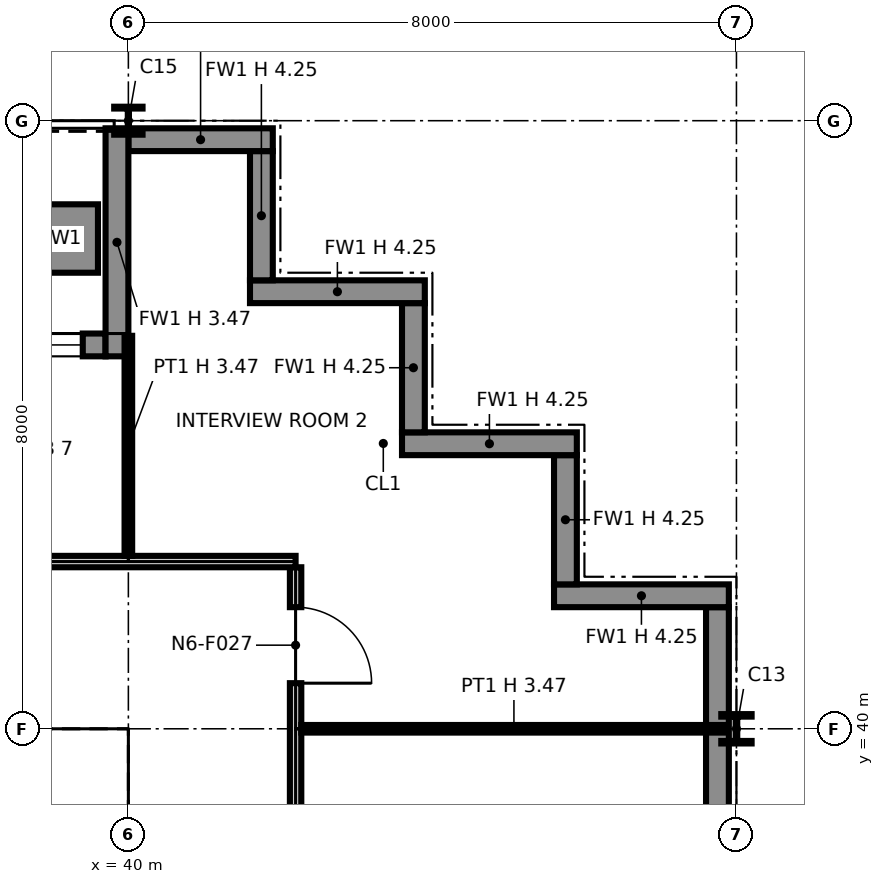
"""IFC4 building model, lengths in metres.
Left out: names, types, materials, properties, quantities, classifications, styles, units other than length and angle.
Written with IfcOpenShell. Run it as: python <this file> out.ifc"""

import sys

from ifc_helpers import new_model, si_unit, direction, frame, frame_2d, origin, origin_2d, place, context, subcontext, project, spatial, polyline, rectangle, i_section, outline, extrude, element, fill, save


model = new_model("IFC4")
c1 = context("Model", 3, precision=1e-05, world=origin(), true_north=direction((0.0, 1.0)))
c2 = subcontext(c1, "Body", "Model", "MODEL_VIEW")
j1 = project(units=[si_unit("LENGTHUNIT", "METRE"), si_unit("PLANEANGLEUNIT", "RADIAN")], contexts=[c1])
p1 = place(None, origin())
s1 = spatial("IfcSite", under=j1, at=p1, CompositionType="ELEMENT")
p2 = place(p1, origin())
s2 = spatial("IfcBuilding", under=s1, at=p2, CompositionType="ELEMENT")
p3 = place(p2, frame((0.0, 0.0, 100.8)))
s3 = spatial("IfcBuildingStorey", under=s2, at=p3, CompositionType="ELEMENT", Elevation=100.8)
p4 = place(p3, frame((40.0, 40.0, 0.0), z_axis=(0.0, 0.0, 1.0), x_axis=(1.0, 0.0, 0.0)))
e1 = element("IfcColumn", 1, at=p4, inside=s3, PredefinedType="COLUMN", context=c2, shape_type="SweptSolid", body=[
    extrude(i_section(OverallWidth=0.257, OverallDepth=0.363, WebThickness=0.013, FlangeThickness=0.022, at=origin_2d()), origin(), (0.0, 0.0, 1.0), 4.25),
])
p5 = place(p3, frame((40.0, 48.0, 0.0), z_axis=(0.0, 0.0, 1.0), x_axis=(1.0, 0.0, 0.0)))
e2 = element("IfcColumn", 2, at=p5, inside=s3, PredefinedType="COLUMN", context=c2, shape_type="SweptSolid", body=[
    extrude(i_section(OverallWidth=0.373, OverallDepth=0.368, WebThickness=0.015, FlangeThickness=0.024, at=origin_2d()), origin(), (0.0, 0.0, 1.0), 4.25),
])
p6 = place(p3, frame((48.0, 40.0, 0.0), z_axis=(0.0, 0.0, 1.0), x_axis=(1.0, 0.0, 0.0)))
e3 = element("IfcColumn", 3, at=p6, inside=s3, PredefinedType="COLUMN", context=c2, shape_type="SweptSolid", body=[
    extrude(i_section(OverallWidth=0.399, OverallDepth=0.386, WebThickness=0.021, FlangeThickness=0.033, at=origin_2d()), origin(), (0.0, 0.0, 1.0), 4.25),
])
p7 = place(p3, frame((47.75, 32.0, 0.0), z_axis=(0.0, 0.0, 1.0), x_axis=(0.0, 1.0, 0.0)))
e4 = element("IfcWall", 4, at=p7, inside=s3, PredefinedType="SOLIDWALL", context=c2, shape_type="SweptSolid", body=[
    extrude(rectangle(XDim=9.6, YDim=0.3, at=frame_2d((4.8, 0.0))), origin(), (0.0, 0.0, 1.0), 4.25),
])
p8 = place(p3, frame((47.9, 41.75, 0.0), z_axis=(0.0, 0.0, 1.0), x_axis=(-1.0, 0.0, 0.0)))
e5 = element("IfcWall", 5, at=p8, inside=s3, PredefinedType="SOLIDWALL", context=c2, shape_type="SweptSolid", body=[
    extrude(rectangle(XDim=2.3, YDim=0.3, at=frame_2d((1.15, 0.0))), origin(), (0.0, 0.0, 1.0), 4.25),
])
p9 = place(p3, frame((45.75, 41.9, 0.0), z_axis=(0.0, 0.0, 1.0), x_axis=(0.0, 1.0, 0.0)))
e6 = element("IfcWall", 6, at=p9, inside=s3, PredefinedType="SOLIDWALL", context=c2, shape_type="SweptSolid", body=[
    extrude(rectangle(XDim=1.7, YDim=0.3, at=frame_2d((0.85, 0.0))), origin(), (0.0, 0.0, 1.0), 4.25),
])
p10 = place(p3, frame((45.9, 43.75, 0.0), z_axis=(0.0, 0.0, 1.0), x_axis=(-1.0, 0.0, 0.0)))
e7 = element("IfcWall", 7, at=p10, inside=s3, PredefinedType="SOLIDWALL", context=c2, shape_type="SweptSolid", body=[
    extrude(rectangle(XDim=2.3, YDim=0.3, at=frame_2d((1.15, 0.0))), origin(), (0.0, 0.0, 1.0), 4.25),
])
p11 = place(p3, frame((43.75, 43.9, 0.0), z_axis=(0.0, 0.0, 1.0), x_axis=(0.0, 1.0, 0.0)))
e8 = element("IfcWall", 8, at=p11, inside=s3, PredefinedType="SOLIDWALL", context=c2, shape_type="SweptSolid", body=[
    extrude(rectangle(XDim=1.7, YDim=0.3, at=frame_2d((0.85, 0.0))), origin(), (0.0, 0.0, 1.0), 4.25),
])
p12 = place(p3, frame((43.9, 45.75, 0.0), z_axis=(0.0, 0.0, 1.0), x_axis=(-1.0, 0.0, 0.0)))
e9 = element("IfcWall", 9, at=p12, inside=s3, PredefinedType="SOLIDWALL", context=c2, shape_type="SweptSolid", body=[
    extrude(rectangle(XDim=2.3, YDim=0.3, at=frame_2d((1.15, 0.0))), origin(), (0.0, 0.0, 1.0), 4.25),
])
p13 = place(p3, frame((41.75, 45.9, 0.0), z_axis=(0.0, 0.0, 1.0), x_axis=(0.0, 1.0, 0.0)))
e10 = element("IfcWall", 10, at=p13, inside=s3, PredefinedType="SOLIDWALL", context=c2, shape_type="SweptSolid", body=[
    extrude(rectangle(XDim=1.7, YDim=0.3, at=frame_2d((0.85, 0.0))), origin(), (0.0, 0.0, 1.0), 4.25),
])
p14 = place(p3, frame((41.9, 47.75, 0.0), z_axis=(0.0, 0.0, 1.0), x_axis=(-1.0, 0.0, 0.0)))
e11 = element("IfcWall", 11, at=p14, inside=s3, PredefinedType="SOLIDWALL", context=c2, shape_type="SweptSolid", body=[
    extrude(rectangle(XDim=1.9, YDim=0.3, at=frame_2d((0.95, 0.0))), origin(), (0.0, 0.0, 1.0), 4.25),
])
p15 = place(p3, frame((39.7, 45.05, 0.0), z_axis=(0.0, 0.0, 1.0), x_axis=(-1.0, 0.0, 0.0)))
e12 = element("IfcWall", 12, at=p15, inside=s3, PredefinedType="SOLIDWALL", context=c2, shape_type="SweptSolid", body=[
    extrude(rectangle(XDim=7.4, YDim=0.3, at=frame_2d((3.7, 0.0))), origin(), (0.0, 0.0, 1.0), 4.25),
])
p16 = place(p15, frame((0.3, 0.0, 0.9)))
e13 = element("IfcOpeningElement", 13, at=p16, cuts=e12, PredefinedType="OPENING", context=c2, shape_type="SweptSolid", body=[
    extrude(rectangle(XDim=2.8, YDim=2.2, at=frame_2d((1.4, 1.1))), frame((0.0, 0.16, 0.0), z_axis=(0.0, -1.0, 0.0), x_axis=(1.0, 0.0, 0.0)), (0.0, 0.0, 1.0), 0.32),
])
p17 = place(p15, frame((4.7, 0.0, 0.0)))
e14 = element("IfcOpeningElement", 14, at=p17, cuts=e12, PredefinedType="OPENING", context=c2, shape_type="SweptSolid", body=[
    extrude(rectangle(XDim=2.0, YDim=2.4, at=frame_2d((1.0, 1.2))), frame((0.0, 0.16, 0.0), z_axis=(0.0, -1.0, 0.0), x_axis=(1.0, 0.0, 0.0)), (0.0, 0.0, 1.0), 0.32),
])
p18 = place(p3, frame((39.85, 47.9, 0.0), z_axis=(0.0, 0.0, 1.0), x_axis=(0.0, -1.0, 0.0)))
e15 = element("IfcWall", 15, at=p18, inside=s3, PredefinedType="SOLIDWALL", context=c2, shape_type="SweptSolid", body=[
    extrude(rectangle(XDim=3.0, YDim=0.3, at=frame_2d((1.5, 0.0))), origin(), (0.0, 0.0, 1.0), 3.469),
])
p19 = place(p3, frame((39.6, 46.45, 0.0), z_axis=(0.0, 0.0, 1.0), x_axis=(-1.0, 0.0, 0.0)))
e16 = element("IfcWall", 16, at=p19, inside=s3, PredefinedType="SOLIDWALL", context=c2, shape_type="SweptSolid", body=[
    extrude(rectangle(XDim=3.2, YDim=0.9, at=frame_2d((1.6, 0.0))), origin(), (0.0, 0.0, 1.0), 0.6),
])
p20 = place(p3, frame((24.65, 39.25, 0.0), z_axis=(0.0, 0.0, 1.0), x_axis=(1.0, 0.0, 0.0)))
e17 = element("IfcWall", 17, at=p20, inside=s3, PredefinedType="PARTITIONING", context=c2, shape_type="SweptSolid", body=[
    extrude(outline(polyline([(0.0, 0.0), (14.7, 0.0), (14.7, 4.25), (7.469, 4.25), (7.469, 3.632), (7.231, 3.632), (7.23, 4.25), (0.0, 4.25), (0.0, 0.0)])), frame((0.0, 0.1, 0.0), z_axis=(0.0, -1.0, 0.0), x_axis=(1.0, 0.0, 0.0)), (0.0, 0.0, 1.0), 0.2),
])
p21 = place(p3, frame((39.25, 32.85, 0.0), z_axis=(0.0, 0.0, 1.0), x_axis=(0.0, 1.0, 0.0)))
e18 = element("IfcWall", 18, at=p21, inside=s3, PredefinedType="PARTITIONING", context=c2, shape_type="SweptSolid", body=[
    extrude(rectangle(XDim=6.3, YDim=0.2, at=frame_2d((3.15, 0.0))), origin(), (0.0, 0.0, 1.0), 4.25),
])
p22 = place(p3, frame((42.2, 16.0, 0.0), z_axis=(0.0, 0.0, 1.0), x_axis=(0.0, 1.0, 0.0)))
e19 = element("IfcWall", 19, at=p22, inside=s3, PredefinedType="PARTITIONING", context=c2, shape_type="SweptSolid", body=[
    extrude(outline(polyline([(0.0, 0.0), (26.125, 0.0), (26.125, 4.25), (24.3, 4.25), (24.298, 3.47), (23.702, 3.47), (23.7, 4.25), (20.3, 4.25), (20.298, 3.47), (19.702, 3.47), (19.7, 4.25), (16.3, 4.25), (16.298, 3.47), (15.702, 3.47), (15.7, 4.25), (12.3, 4.25), (12.298, 3.47), (11.702, 3.47), (11.7, 4.25), (8.3, 4.25), (8.298, 3.47), (7.702, 3.47), (7.7, 4.25), (4.3, 4.25), (4.298, 3.47), (3.702, 3.47), (3.7, 4.25), (0.0, 4.25), (0.0, 0.0)])), frame((0.0, 0.075, 0.0), z_axis=(0.0, -1.0, 0.0), x_axis=(1.0, 0.0, 0.0)), (0.0, 0.0, 1.0), 0.15),
])
p23 = place(p22, frame((2.5, 0.0, 0.0), z_axis=(0.0, 0.0, 1.0), x_axis=(-1.0, 0.0, 0.0)))
e20 = element("IfcOpeningElement", 20, at=p23, cuts=e19, PredefinedType="OPENING", context=c2, shape_type="SweptSolid", body=[
    extrude(rectangle(XDim=1.0, YDim=2.1, at=frame_2d((0.5, 1.05))), frame((0.0, 0.085, 0.0), z_axis=(0.0, -1.0, 0.0), x_axis=(1.0, 0.0, 0.0)), (0.0, 0.0, 1.0), 0.17),
])
p24 = place(p22, frame((6.5, 0.0, 0.0), z_axis=(0.0, 0.0, 1.0), x_axis=(-1.0, 0.0, 0.0)))
e21 = element("IfcOpeningElement", 21, at=p24, cuts=e19, PredefinedType="OPENING", context=c2, shape_type="SweptSolid", body=[
    extrude(rectangle(XDim=1.0, YDim=2.1, at=frame_2d((0.5, 1.05))), frame((0.0, 0.085, 0.0), z_axis=(0.0, -1.0, 0.0), x_axis=(1.0, 0.0, 0.0)), (0.0, 0.0, 1.0), 0.17),
])
p25 = place(p22, frame((12.5, 0.0, 0.0), z_axis=(0.0, 0.0, 1.0), x_axis=(-1.0, 0.0, 0.0)))
e22 = element("IfcOpeningElement", 22, at=p25, cuts=e19, PredefinedType="OPENING", context=c2, shape_type="SweptSolid", body=[
    extrude(rectangle(XDim=1.0, YDim=2.1, at=frame_2d((0.5, 1.05))), frame((0.0, 0.085, 0.0), z_axis=(0.0, -1.0, 0.0), x_axis=(1.0, 0.0, 0.0)), (0.0, 0.0, 1.0), 0.17),
])
p26 = place(p22, frame((18.5, 0.0, 0.0), z_axis=(0.0, 0.0, 1.0), x_axis=(-1.0, 0.0, 0.0)))
e23 = element("IfcOpeningElement", 23, at=p26, cuts=e19, PredefinedType="OPENING", context=c2, shape_type="SweptSolid", body=[
    extrude(rectangle(XDim=1.0, YDim=2.1, at=frame_2d((0.5, 1.05))), frame((0.0, 0.085, 0.0), z_axis=(0.0, -1.0, 0.0), x_axis=(1.0, 0.0, 0.0)), (0.0, 0.0, 1.0), 0.17),
])
p27 = place(p22, frame((22.5, 0.0, 0.0), z_axis=(0.0, 0.0, 1.0), x_axis=(-1.0, 0.0, 0.0)))
e24 = element("IfcOpeningElement", 24, at=p27, cuts=e19, PredefinedType="OPENING", context=c2, shape_type="SweptSolid", body=[
    extrude(rectangle(XDim=1.0, YDim=2.1, at=frame_2d((0.5, 1.05))), frame((0.0, 0.085, 0.0), z_axis=(0.0, -1.0, 0.0), x_axis=(1.0, 0.0, 0.0)), (0.0, 0.0, 1.0), 0.17),
])
p28 = place(p22, frame((25.6, 0.0, 0.0), z_axis=(0.0, 0.0, 1.0), x_axis=(-1.0, 0.0, 0.0)))
e25 = element("IfcOpeningElement", 25, at=p28, cuts=e19, PredefinedType="OPENING", context=c2, shape_type="SweptSolid", body=[
    extrude(rectangle(XDim=1.0, YDim=2.1, at=frame_2d((0.5, 1.05))), frame((0.0, 0.085, 0.0), z_axis=(0.0, -1.0, 0.0), x_axis=(1.0, 0.0, 0.0)), (0.0, 0.0, 1.0), 0.17),
])
p29 = place(p3, frame((42.275, 40.0, 0.0), z_axis=(0.0, 0.0, 1.0), x_axis=(1.0, 0.0, 0.0)))
e26 = element("IfcWall", 26, at=p29, inside=s3, PredefinedType="PARTITIONING", context=c2, shape_type="SweptSolid", body=[
    extrude(rectangle(XDim=5.595, YDim=0.1, at=frame_2d((2.798, 0.0))), origin(), (0.0, 0.0, 1.0), 3.47),
])
p30 = place(p3, frame((8.05, 42.2, 0.0), z_axis=(0.0, 0.0, 1.0), x_axis=(1.0, 0.0, 0.0)))
e27 = element("IfcWall", 27, at=p30, inside=s3, PredefinedType="PARTITIONING", context=c2, shape_type="SweptSolid", body=[
    extrude(rectangle(XDim=34.15, YDim=0.15, at=frame_2d((17.075, 0.0))), origin(), (0.0, 0.0, 1.0), 4.25),
])
p31 = place(p30, frame((11.45, 0.0, 0.0)))
e28 = element("IfcOpeningElement", 28, at=p31, cuts=e27, PredefinedType="OPENING", context=c2, shape_type="SweptSolid", body=[
    extrude(rectangle(XDim=1.0, YDim=2.1, at=frame_2d((0.5, 1.05))), frame((0.0, 0.085, 0.0), z_axis=(0.0, -1.0, 0.0), x_axis=(1.0, 0.0, 0.0)), (0.0, 0.0, 1.0), 0.17),
])
p32 = place(p30, frame((27.45, 0.0, 0.0)))
e29 = element("IfcOpeningElement", 29, at=p32, cuts=e27, PredefinedType="OPENING", context=c2, shape_type="SweptSolid", body=[
    extrude(rectangle(XDim=1.0, YDim=2.1, at=frame_2d((0.5, 1.05))), frame((0.0, 0.085, 0.0), z_axis=(0.0, -1.0, 0.0), x_axis=(1.0, 0.0, 0.0)), (0.0, 0.0, 1.0), 0.17),
])
p33 = place(p30, frame((1.45, 0.0, 0.0)))
e30 = element("IfcOpeningElement", 30, at=p33, cuts=e27, PredefinedType="OPENING", context=c2, shape_type="SweptSolid", body=[
    extrude(rectangle(XDim=1.0, YDim=2.1, at=frame_2d((0.5, 1.05))), frame((0.0, 0.085, 0.0), z_axis=(0.0, -1.0, 0.0), x_axis=(1.0, 0.0, 0.0)), (0.0, 0.0, 1.0), 0.17),
])
p34 = place(p30, frame((5.45, 0.0, 0.0)))
e31 = element("IfcOpeningElement", 31, at=p34, cuts=e27, PredefinedType="OPENING", context=c2, shape_type="SweptSolid", body=[
    extrude(rectangle(XDim=1.0, YDim=2.1, at=frame_2d((0.5, 1.05))), frame((0.0, 0.085, 0.0), z_axis=(0.0, -1.0, 0.0), x_axis=(1.0, 0.0, 0.0)), (0.0, 0.0, 1.0), 0.17),
])
p35 = place(p30, frame((17.45, 0.0, 0.0)))
e32 = element("IfcOpeningElement", 32, at=p35, cuts=e27, PredefinedType="OPENING", context=c2, shape_type="SweptSolid", body=[
    extrude(rectangle(XDim=1.0, YDim=2.1, at=frame_2d((0.5, 1.05))), frame((0.0, 0.085, 0.0), z_axis=(0.0, -1.0, 0.0), x_axis=(1.0, 0.0, 0.0)), (0.0, 0.0, 1.0), 0.17),
])
p36 = place(p30, frame((21.45, 0.0, 0.0)))
e33 = element("IfcOpeningElement", 33, at=p36, cuts=e27, PredefinedType="OPENING", context=c2, shape_type="SweptSolid", body=[
    extrude(rectangle(XDim=1.0, YDim=2.1, at=frame_2d((0.5, 1.05))), frame((0.0, 0.085, 0.0), z_axis=(0.0, -1.0, 0.0), x_axis=(1.0, 0.0, 0.0)), (0.0, 0.0, 1.0), 0.17),
])
p37 = place(p3, frame((40.0, 42.275, 0.0), z_axis=(0.0, 0.0, 1.0), x_axis=(0.0, 1.0, 0.0)))
e34 = element("IfcWall", 34, at=p37, inside=s3, PredefinedType="PARTITIONING", context=c2, shape_type="SweptSolid", body=[
    extrude(rectangle(XDim=2.895, YDim=0.1, at=frame_2d((1.448, 0.0))), origin(), (0.0, 0.0, 1.0), 3.47),
])
p38 = place(p16, origin())
e35 = element("IfcWindow", 35, at=p38, inside=s3, PartitioningType="SINGLE_PANEL", PredefinedType="WINDOW", context=c2, shape_type="SweptSolid", body=[
    extrude(rectangle(XDim=2.8, YDim=2.2, at=frame_2d((1.4, 1.1))), frame((0.0, 0.03, 0.0), z_axis=(0.0, -1.0, 0.0), x_axis=(1.0, 0.0, 0.0)), (0.0, 0.0, 1.0), 0.06),
])
fill(e13, e35)
p39 = place(p28, origin())
e36 = element("IfcDoor", 36, at=p39, inside=s3, OperationType="SINGLE_SWING_RIGHT", PredefinedType="DOOR", context=c2, shape_type="SweptSolid", body=[
    extrude(rectangle(XDim=1.0, YDim=2.1, at=frame_2d((0.5, 1.05))), frame((0.0, 0.025, 0.0), z_axis=(0.0, -1.0, 0.0), x_axis=(1.0, 0.0, 0.0)), (0.0, 0.0, 1.0), 0.05),
])
fill(e25, e36)
save(model, sys.argv[1])
